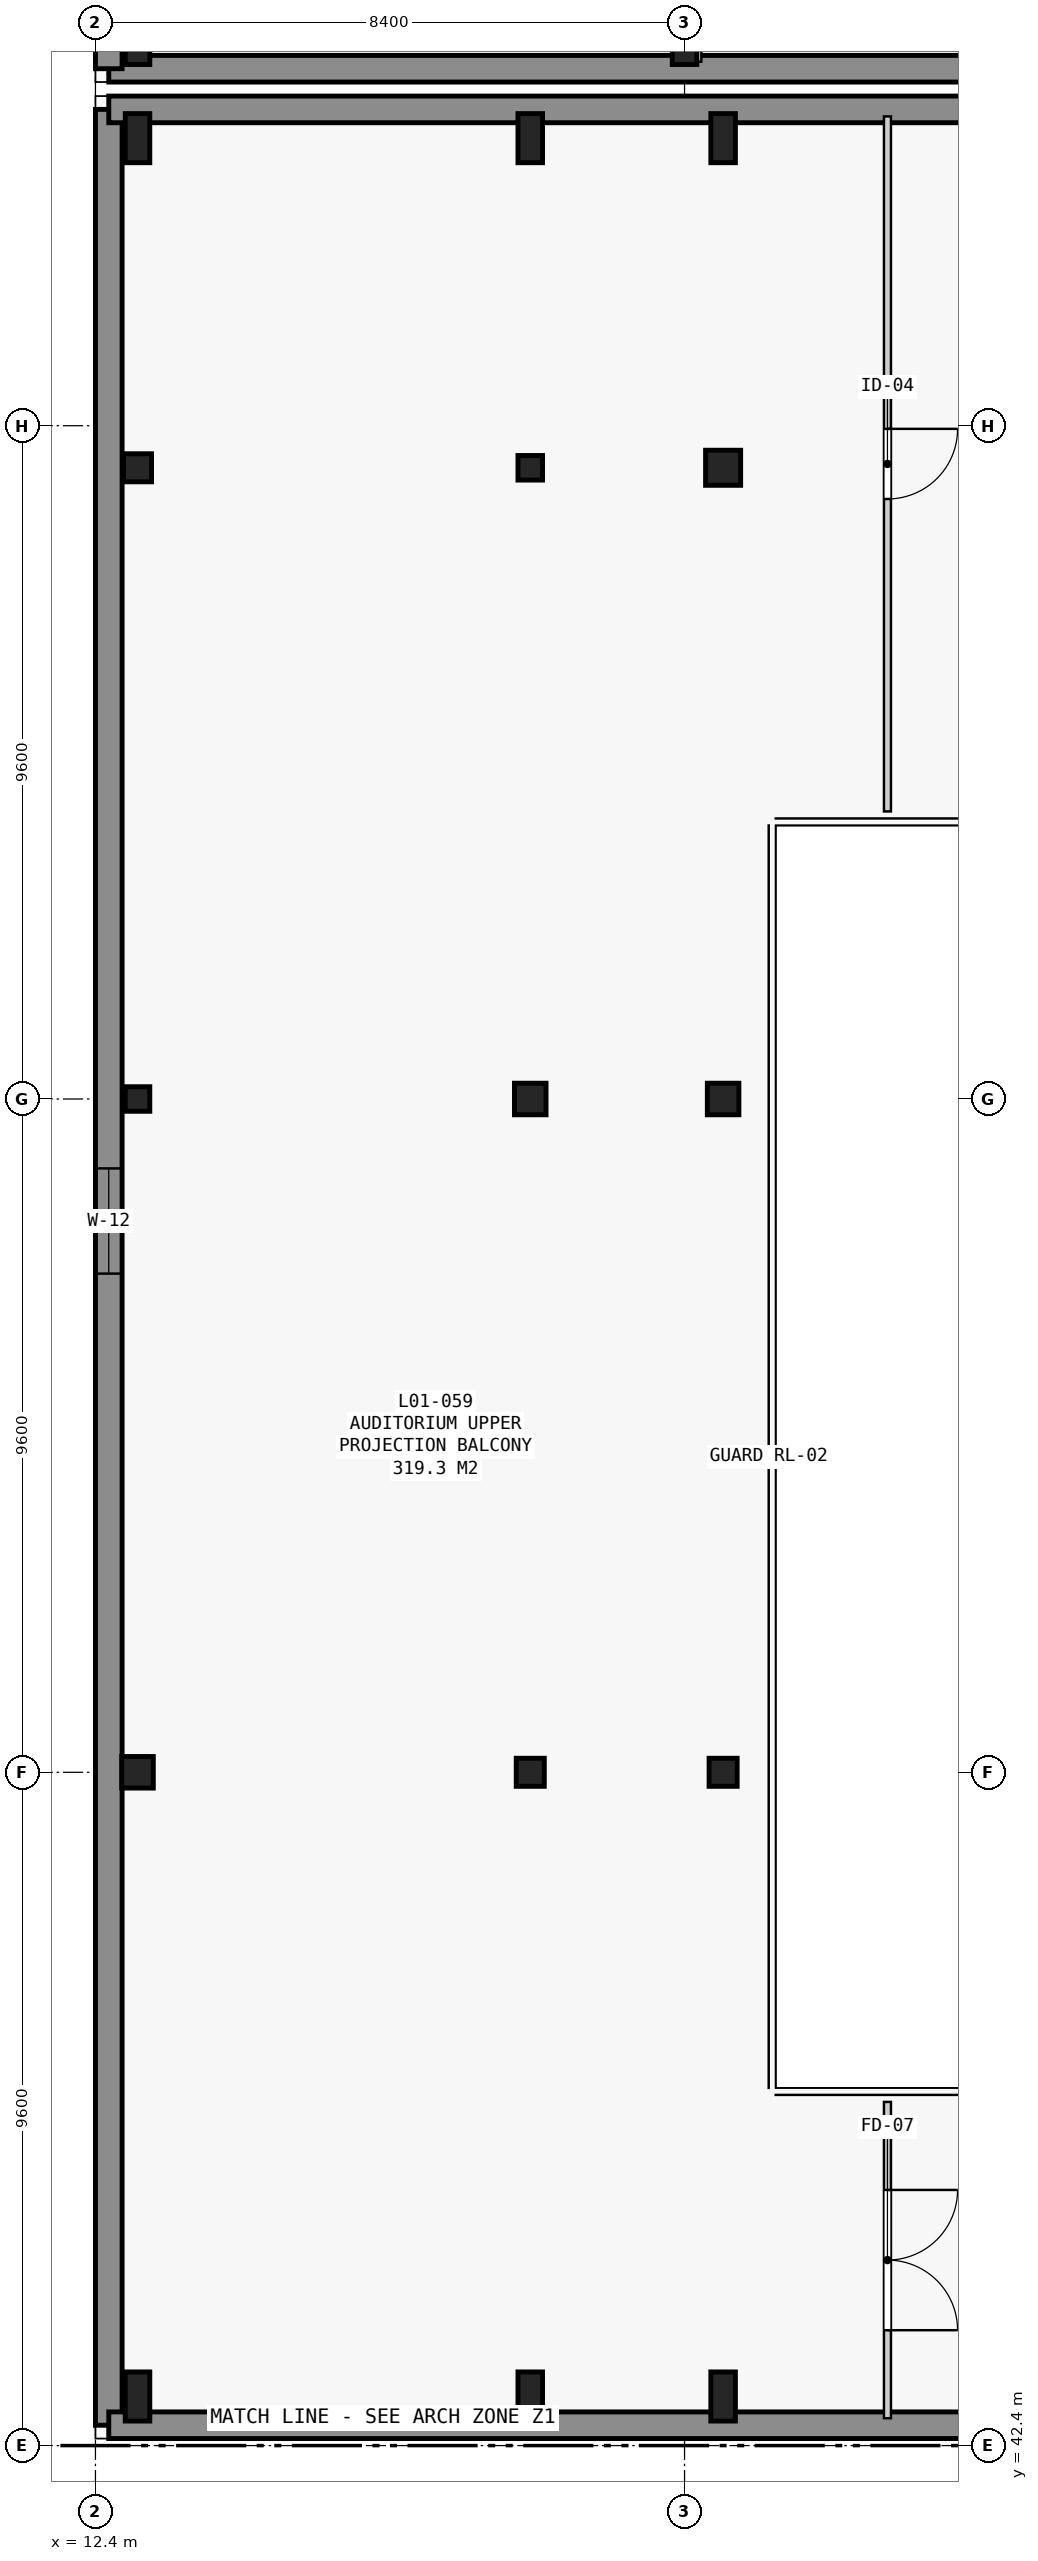
"""IFC4 building model, lengths in metres.
Left out: names, types, materials, properties, quantities, classifications, styles, units other than length and angle.
Written with IfcOpenShell. Run it as: python <this file> out.ifc"""

import sys

from ifc_helpers import new_model, si_unit, direction, frame, frame_2d, origin, origin_2d, place, context, subcontext, project, spatial, rectangle, extrude, element, fill, save


model = new_model("IFC4")
c1 = context("Model", 3, precision=1e-05, world=origin(), true_north=direction((0.0, 1.0)))
c2 = subcontext(c1, "Body", "Model", "MODEL_VIEW")
j1 = project(units=[si_unit("LENGTHUNIT", "METRE"), si_unit("PLANEANGLEUNIT", "RADIAN")], contexts=[c1])
p1 = place(None, origin())
s1 = spatial("IfcSite", under=j1, at=p1, CompositionType="ELEMENT")
p2 = place(p1, origin())
s2 = spatial("IfcBuilding", under=s1, at=p2, CompositionType="ELEMENT")
p3 = place(p2, frame((0.0, 0.0, 5.4)))
s3 = spatial("IfcBuildingStorey", under=s2, at=p3, CompositionType="ELEMENT", Elevation=5.4)
for number, where, z_axis, x_axis in (
    (1, (13.0, 76.7, 0.0), (0.0, 0.0, 1.0), (1.0, 0.0, 0.0)),
    (2, (20.8, 76.7, 0.0), (0.0, 0.0, 1.0), (1.0, 0.0, 0.0)),
    (3, (13.0, 43.1, 0.0), (0.0, 0.0, 1.0), (1.0, 0.0, 0.0)),
):
    element("IfcColumn", number, at=place(p3, frame(where, z_axis=z_axis, x_axis=x_axis)), inside=s3, PredefinedType="COLUMN", context=c2, shape_type="SweptSolid", body=[
        extrude(rectangle(XDim=0.35, YDim=0.7, at=origin_2d()), origin(), (0.0, 0.0, 1.0), 4.2),
    ])
p4 = place(p3, frame((13.0, 52.0, 0.0), z_axis=(0.0, 0.0, 1.0), x_axis=(1.0, 0.0, 0.0)))
e4 = element("IfcColumn", 4, at=p4, inside=s3, PredefinedType="COLUMN", context=c2, shape_type="SweptSolid", body=[
    extrude(rectangle(XDim=0.45, YDim=0.45, at=origin_2d()), origin(), (0.0, 0.0, 1.0), 4.2),
])
p5 = place(p3, frame((13.0, 61.6, 0.0), z_axis=(0.0, 0.0, 1.0), x_axis=(1.0, 0.0, 0.0)))
e5 = element("IfcColumn", 5, at=p5, inside=s3, PredefinedType="COLUMN", context=c2, shape_type="SweptSolid", body=[
    extrude(rectangle(XDim=0.35, YDim=0.35, at=origin_2d()), origin(), (0.0, 0.0, 1.0), 4.2),
])
p6 = place(p3, frame((13.0, 70.6, 0.0), z_axis=(0.0, 0.0, 1.0), x_axis=(1.0, 0.0, 0.0)))
e6 = element("IfcColumn", 6, at=p6, inside=s3, PredefinedType="COLUMN", context=c2, shape_type="SweptSolid", body=[
    extrude(rectangle(XDim=0.4, YDim=0.4, at=origin_2d()), origin(), (0.0, 0.0, 1.0), 4.2),
])
for number, where, z_axis, x_axis in (
    (7, (13.0, 75.3, 0.0), (0.0, 0.0, 1.0), (1.0, 0.0, 0.0)),
    (8, (18.6, 43.1, 0.0), (0.0, 0.0, 1.0), (1.0, 0.0, 0.0)),
):
    element("IfcColumn", number, at=place(p3, frame(where, z_axis=z_axis, x_axis=x_axis)), inside=s3, PredefinedType="COLUMN", context=c2, shape_type="SweptSolid", body=[
        extrude(rectangle(XDim=0.35, YDim=0.7, at=origin_2d()), origin(), (0.0, 0.0, 1.0), 4.2),
    ])
p7 = place(p3, frame((18.6, 52.0, 0.0), z_axis=(0.0, 0.0, 1.0), x_axis=(1.0, 0.0, 0.0)))
e9 = element("IfcColumn", 9, at=p7, inside=s3, PredefinedType="COLUMN", context=c2, shape_type="SweptSolid", body=[
    extrude(rectangle(XDim=0.4, YDim=0.4, at=origin_2d()), origin(), (0.0, 0.0, 1.0), 4.2),
])
p8 = place(p3, frame((18.6, 61.6, 0.0), z_axis=(0.0, 0.0, 1.0), x_axis=(1.0, 0.0, 0.0)))
e10 = element("IfcColumn", 10, at=p8, inside=s3, PredefinedType="COLUMN", context=c2, shape_type="SweptSolid", body=[
    extrude(rectangle(XDim=0.45, YDim=0.45, at=origin_2d()), origin(), (0.0, 0.0, 1.0), 4.2),
])
p9 = place(p3, frame((18.6, 70.6, 0.0), z_axis=(0.0, 0.0, 1.0), x_axis=(1.0, 0.0, 0.0)))
e11 = element("IfcColumn", 11, at=p9, inside=s3, PredefinedType="COLUMN", context=c2, shape_type="SweptSolid", body=[
    extrude(rectangle(XDim=0.35, YDim=0.35, at=origin_2d()), origin(), (0.0, 0.0, 1.0), 4.2),
])
for number, where, z_axis, x_axis in (
    (12, (18.6, 75.3, 0.0), (0.0, 0.0, 1.0), (1.0, 0.0, 0.0)),
    (13, (21.35, 43.1, 0.0), (0.0, 0.0, 1.0), (1.0, 0.0, 0.0)),
):
    element("IfcColumn", number, at=place(p3, frame(where, z_axis=z_axis, x_axis=x_axis)), inside=s3, PredefinedType="COLUMN", context=c2, shape_type="SweptSolid", body=[
        extrude(rectangle(XDim=0.35, YDim=0.7, at=origin_2d()), origin(), (0.0, 0.0, 1.0), 4.2),
    ])
p10 = place(p3, frame((21.35, 52.0, 0.0), z_axis=(0.0, 0.0, 1.0), x_axis=(1.0, 0.0, 0.0)))
e14 = element("IfcColumn", 14, at=p10, inside=s3, PredefinedType="COLUMN", context=c2, shape_type="SweptSolid", body=[
    extrude(rectangle(XDim=0.4, YDim=0.4, at=origin_2d()), origin(), (0.0, 0.0, 1.0), 4.2),
])
p11 = place(p3, frame((21.35, 61.6, 0.0), z_axis=(0.0, 0.0, 1.0), x_axis=(1.0, 0.0, 0.0)))
e15 = element("IfcColumn", 15, at=p11, inside=s3, PredefinedType="COLUMN", context=c2, shape_type="SweptSolid", body=[
    extrude(rectangle(XDim=0.45, YDim=0.45, at=origin_2d()), origin(), (0.0, 0.0, 1.0), 4.2),
])
p12 = place(p3, frame((21.35, 70.6, 0.0), z_axis=(0.0, 0.0, 1.0), x_axis=(1.0, 0.0, 0.0)))
e16 = element("IfcColumn", 16, at=p12, inside=s3, PredefinedType="COLUMN", context=c2, shape_type="SweptSolid", body=[
    extrude(rectangle(XDim=0.5, YDim=0.5, at=origin_2d()), origin(), (0.0, 0.0, 1.0), 4.2),
])
p13 = place(p3, frame((21.35, 75.3, 0.0), z_axis=(0.0, 0.0, 1.0), x_axis=(1.0, 0.0, 0.0)))
e17 = element("IfcColumn", 17, at=p13, inside=s3, PredefinedType="COLUMN", context=c2, shape_type="SweptSolid", body=[
    extrude(rectangle(XDim=0.35, YDim=0.7, at=origin_2d()), origin(), (0.0, 0.0, 1.0), 4.2),
])
p14 = place(p3, frame((45.71, 76.29, 0.0), z_axis=(0.0, 0.0, 1.0), x_axis=(-1.0, 0.0, 0.0)))
e18 = element("IfcWall", 18, at=p14, inside=s3, PredefinedType="STANDARD", context=c2, shape_type="SweptSolid", body=[
    extrude(rectangle(XDim=33.12, YDim=0.38, at=frame_2d((16.56, 0.0))), origin(), (0.0, 0.0, 1.0), 3.94),
])
p15 = place(p3, frame((12.59, 76.29, 0.0), z_axis=(0.0, 0.0, 1.0), x_axis=(0.0, 1.0, 0.0)))
e19 = element("IfcWall", 19, at=p15, inside=s3, PredefinedType="STANDARD", context=c2, shape_type="SweptSolid", body=[
    extrude(rectangle(XDim=41.52, YDim=0.38, at=frame_2d((20.76, 0.0))), origin(), (0.0, 0.0, 1.0), 3.88),
])
p16 = place(p3, frame((12.59, 42.69, 0.0), z_axis=(0.0, 0.0, 1.0), x_axis=(0.0, 1.0, 0.0)))
e20 = element("IfcWall", 20, at=p16, inside=s3, PredefinedType="STANDARD", context=c2, shape_type="SweptSolid", body=[
    extrude(rectangle(XDim=33.02, YDim=0.38, at=frame_2d((16.51, 0.0))), origin(), (0.0, 0.0, 1.0), 3.94),
])
p17 = place(p16, frame((16.42, 0.0, 0.96)))
e21 = element("IfcOpeningElement", 21, at=p17, cuts=e20, PredefinedType="OPENING", context=c2, shape_type="SweptSolid", body=[
    extrude(rectangle(XDim=1.5, YDim=2.6, at=frame_2d((0.75, 1.3))), frame((0.0, 0.2, 0.0), z_axis=(0.0, -1.0, 0.0), x_axis=(1.0, 0.0, 0.0)), (0.0, 0.0, 1.0), 0.4),
])
p18 = place(p3, frame((12.59, 75.71, 0.0), z_axis=(0.0, 0.0, 1.0), x_axis=(1.0, 0.0, 0.0)))
e22 = element("IfcWall", 22, at=p18, inside=s3, PredefinedType="STANDARD", context=c2, shape_type="SweptSolid", body=[
    extrude(rectangle(XDim=33.12, YDim=0.38, at=frame_2d((16.56, 0.0))), origin(), (0.0, 0.0, 1.0), 3.94),
])
p19 = place(p3, frame((45.71, 42.69, 0.0), z_axis=(0.0, 0.0, 1.0), x_axis=(-1.0, 0.0, 0.0)))
e23 = element("IfcWall", 23, at=p19, inside=s3, PredefinedType="STANDARD", context=c2, shape_type="SweptSolid", body=[
    extrude(rectangle(XDim=33.12, YDim=0.38, at=frame_2d((16.56, 0.0))), origin(), (0.0, 0.0, 1.0), 3.94),
])
p20 = place(p19, frame((3.61, 0.0, 0.0)))
e24 = element("IfcOpeningElement", 24, at=p20, cuts=e23, PredefinedType="OPENING", context=c2, shape_type="SweptSolid", body=[
    extrude(rectangle(XDim=1.8, YDim=2.2, at=frame_2d((0.9, 1.1))), frame((0.0, 0.2, 0.0), z_axis=(0.0, -1.0, 0.0), x_axis=(1.0, 0.0, 0.0)), (0.0, 0.0, 1.0), 0.4),
])
p21 = place(p19, frame((13.997, 0.0, 1.05)))
e25 = element("IfcOpeningElement", 25, at=p21, cuts=e23, PredefinedType="OPENING", context=c2, shape_type="SweptSolid", body=[
    extrude(rectangle(XDim=1.65, YDim=2.2, at=frame_2d((0.825, 1.1))), frame((0.0, 0.2, 0.0), z_axis=(0.0, -1.0, 0.0), x_axis=(1.0, 0.0, 0.0)), (0.0, 0.0, 1.0), 0.4),
])
p22 = place(p3, frame((20.965, 97.165, 0.0), z_axis=(0.0, 0.0, 1.0), x_axis=(0.0, -1.0, 0.0)))
e26 = element("IfcWall", 26, at=p22, inside=s3, PredefinedType="PARTITIONING", context=c2, shape_type="SweptSolid", body=[
    extrude(rectangle(XDim=20.775, YDim=0.15, at=frame_2d((10.387, 0.0))), origin(), (0.0, 0.0, 1.0), 3.01),
])
p23 = place(p22, frame((9.837, 0.0, 0.0)))
e27 = element("IfcOpeningElement", 27, at=p23, cuts=e26, PredefinedType="OPENING", context=c2, shape_type="SweptSolid", body=[
    extrude(rectangle(XDim=1.1, YDim=2.15, at=frame_2d((0.55, 1.075))), frame((0.0, 0.085, 0.0), z_axis=(0.0, -1.0, 0.0), x_axis=(1.0, 0.0, 0.0)), (0.0, 0.0, 1.0), 0.17),
])
p24 = place(p3, frame((23.693, 75.61, 0.0), z_axis=(0.0, 0.0, 1.0), x_axis=(0.0, -1.0, 0.0)))
e28 = element("IfcWall", 28, at=p24, inside=s3, PredefinedType="PARTITIONING", context=c2, shape_type="SweptSolid", body=[
    extrude(rectangle(XDim=9.91, YDim=0.1, at=frame_2d((4.955, 0.0))), origin(), (0.0, 0.0, 1.0), 3.32),
])
p25 = place(p24, frame((4.455, 0.0, 0.0)))
e29 = element("IfcOpeningElement", 29, at=p25, cuts=e28, PredefinedType="OPENING", context=c2, shape_type="SweptSolid", body=[
    extrude(rectangle(XDim=1.0, YDim=2.15, at=frame_2d((0.5, 1.075))), frame((0.0, 0.06, 0.0), z_axis=(0.0, -1.0, 0.0), x_axis=(1.0, 0.0, 0.0)), (0.0, 0.0, 1.0), 0.12),
])
p26 = place(p3, frame((23.693, 47.3, 0.0), z_axis=(0.0, 0.0, 1.0), x_axis=(0.0, -1.0, 0.0)))
e30 = element("IfcWall", 30, at=p26, inside=s3, PredefinedType="PARTITIONING", context=c2, shape_type="SweptSolid", body=[
    extrude(rectangle(XDim=4.51, YDim=0.1, at=frame_2d((2.255, 0.0))), origin(), (0.0, 0.0, 1.0), 3.32),
])
p27 = place(p26, frame((1.255, 0.0, 0.0)))
e31 = element("IfcOpeningElement", 31, at=p27, cuts=e30, PredefinedType="OPENING", context=c2, shape_type="SweptSolid", body=[
    extrude(rectangle(XDim=2.0, YDim=2.25, at=frame_2d((1.0, 1.125))), frame((0.0, 0.06, 0.0), z_axis=(0.0, -1.0, 0.0), x_axis=(1.0, 0.0, 0.0)), (0.0, 0.0, 1.0), 0.12),
])
p28 = place(p17, origin())
e32 = element("IfcWindow", 32, at=p28, inside=s3, PartitioningType="SINGLE_PANEL", PredefinedType="WINDOW", context=c2, shape_type="SweptSolid", body=[
    extrude(rectangle(XDim=1.5, YDim=2.6, at=frame_2d((0.75, 1.3))), frame((0.0, 0.03, 0.0), z_axis=(0.0, -1.0, 0.0), x_axis=(1.0, 0.0, 0.0)), (0.0, 0.0, 1.0), 0.06),
])
fill(e21, e32)
p29 = place(p25, origin())
e33 = element("IfcDoor", 33, at=p29, inside=s3, OperationType="SINGLE_SWING_LEFT", PredefinedType="DOOR", context=c2, shape_type="SweptSolid", body=[
    extrude(rectangle(XDim=1.0, YDim=2.15, at=frame_2d((0.5, 1.075))), frame((0.0, 0.025, 0.0), z_axis=(0.0, -1.0, 0.0), x_axis=(1.0, 0.0, 0.0)), (0.0, 0.0, 1.0), 0.05),
])
fill(e29, e33)
p30 = place(p27, origin())
e34 = element("IfcDoor", 34, at=p30, inside=s3, OperationType="DOUBLE_DOOR_SINGLE_SWING", PredefinedType="DOOR", context=c2, shape_type="SweptSolid", body=[
    extrude(rectangle(XDim=2.0, YDim=2.25, at=frame_2d((1.0, 1.125))), frame((0.0, 0.025, 0.0), z_axis=(0.0, -1.0, 0.0), x_axis=(1.0, 0.0, 0.0)), (0.0, 0.0, 1.0), 0.05),
])
fill(e31, e34)
save(model, sys.argv[1])
